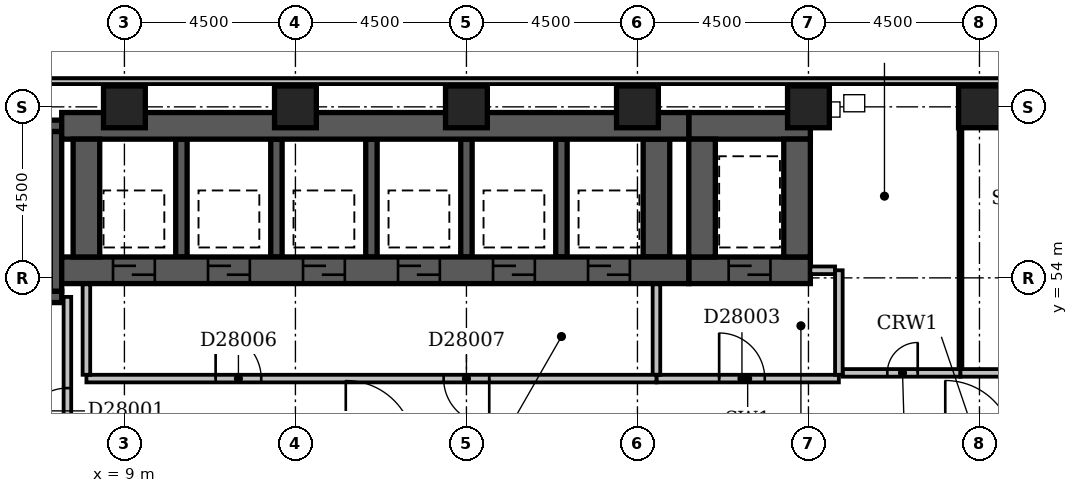
"""IFC4 building model, lengths in metres.
Left out: names, types, materials, properties, quantities, classifications, styles, units other than length and angle.
Written with IfcOpenShell. Run it as: python <this file> out.ifc"""

import sys

from ifc_helpers import new_model, si_unit, direction, frame, frame_2d, origin, origin_2d, place, context, subcontext, project, spatial, rectangle, extrude, element, fill, save


model = new_model("IFC4")
c1 = context("Model", 3, precision=1e-05, world=origin(), true_north=direction((0.0, 1.0)))
c2 = subcontext(c1, "Body", "Model", "MODEL_VIEW")
j1 = project(units=[si_unit("LENGTHUNIT", "METRE"), si_unit("PLANEANGLEUNIT", "RADIAN")], contexts=[c1])
p1 = place(None, origin())
s1 = spatial("IfcSite", under=j1, at=p1, CompositionType="ELEMENT")
p2 = place(p1, origin())
s2 = spatial("IfcBuilding", under=s1, at=p2, CompositionType="ELEMENT")
p3 = place(p2, frame((0.0, 0.0, 113.6)))
s3 = spatial("IfcBuildingStorey", under=s2, at=p3, CompositionType="ELEMENT", Elevation=113.6)
p4 = place(p3, frame((0.35, 53.5, -0.5), z_axis=(0.0, 0.0, 1.0), x_axis=(1.0, 0.0, 0.0)))
e1 = element("IfcWall", 1, at=p4, inside=s3, PredefinedType="SHEAR", context=c2, shape_type="SweptSolid", body=[
    extrude(rectangle(XDim=7.0, YDim=0.3, at=frame_2d((3.5, 0.0))), origin(), (0.0, 0.0, 1.0), 6.2),
])
p5 = place(p4, frame((5.58, 0.0, 0.5)))
e2 = element("IfcOpeningElement", 2, at=p5, cuts=e1, PredefinedType="OPENING", context=c2, shape_type="SweptSolid", body=[
    extrude(rectangle(XDim=1.1, YDim=2.1, at=frame_2d((0.55, 1.05))), frame((0.0, 0.162, 0.0), z_axis=(0.0, -1.0, 0.0), x_axis=(1.0, 0.0, 0.0)), (0.0, 0.0, 1.0), 0.324),
])
p6 = place(p3, frame((0.35, 58.0, -0.5), z_axis=(0.0, 0.0, 1.0), x_axis=(1.0, 0.0, 0.0)))
e3 = element("IfcWall", 3, at=p6, inside=s3, PredefinedType="SHEAR", context=c2, shape_type="SweptSolid", body=[
    extrude(rectangle(XDim=7.0, YDim=0.3, at=frame_2d((3.5, 0.0))), origin(), (0.0, 0.0, 1.0), 6.2),
])
p7 = place(p3, frame((7.2, 53.65, -0.5), z_axis=(0.0, 0.0, 1.0), x_axis=(0.0, 1.0, 0.0)))
e4 = element("IfcWall", 4, at=p7, inside=s3, PredefinedType="SHEAR", context=c2, shape_type="SweptSolid", body=[
    extrude(rectangle(XDim=4.2, YDim=0.3, at=frame_2d((2.1, 0.0))), origin(), (0.0, 0.0, 1.0), 6.2),
])
p8 = place(p3, frame((7.35, 54.2, -0.5), z_axis=(0.0, 0.0, 1.0), x_axis=(1.0, 0.0, 0.0)))
e5 = element("IfcWall", 5, at=p8, inside=s3, PredefinedType="SHEAR", context=c2, shape_type="SweptSolid", body=[
    extrude(rectangle(XDim=16.5, YDim=0.7, at=frame_2d((8.25, 0.0))), origin(), (0.0, 0.0, 1.0), 6.2),
])
p9 = place(p8, frame((1.35, 0.0, 0.5)))
e6 = element("IfcOpeningElement", 6, at=p9, cuts=e5, PredefinedType="OPENING", context=c2, shape_type="SweptSolid", body=[
    extrude(rectangle(XDim=1.1, YDim=2.1, at=frame_2d((0.55, 1.05))), frame((0.0, 0.362, 0.0), z_axis=(0.0, -1.0, 0.0), x_axis=(1.0, 0.0, 0.0)), (0.0, 0.0, 1.0), 0.724),
])
p10 = place(p8, frame((3.85, 0.0, 0.5)))
e7 = element("IfcOpeningElement", 7, at=p10, cuts=e5, PredefinedType="OPENING", context=c2, shape_type="SweptSolid", body=[
    extrude(rectangle(XDim=1.1, YDim=2.1, at=frame_2d((0.55, 1.05))), frame((0.0, 0.362, 0.0), z_axis=(0.0, -1.0, 0.0), x_axis=(1.0, 0.0, 0.0)), (0.0, 0.0, 1.0), 0.724),
])
p11 = place(p8, frame((6.35, 0.0, 0.5)))
e8 = element("IfcOpeningElement", 8, at=p11, cuts=e5, PredefinedType="OPENING", context=c2, shape_type="SweptSolid", body=[
    extrude(rectangle(XDim=1.1, YDim=2.1, at=frame_2d((0.55, 1.05))), frame((0.0, 0.362, 0.0), z_axis=(0.0, -1.0, 0.0), x_axis=(1.0, 0.0, 0.0)), (0.0, 0.0, 1.0), 0.724),
])
p12 = place(p8, frame((8.85, 0.0, 0.5)))
e9 = element("IfcOpeningElement", 9, at=p12, cuts=e5, PredefinedType="OPENING", context=c2, shape_type="SweptSolid", body=[
    extrude(rectangle(XDim=1.1, YDim=2.1, at=frame_2d((0.55, 1.05))), frame((0.0, 0.362, 0.0), z_axis=(0.0, -1.0, 0.0), x_axis=(1.0, 0.0, 0.0)), (0.0, 0.0, 1.0), 0.724),
])
p13 = place(p8, frame((11.35, 0.0, 0.5)))
e10 = element("IfcOpeningElement", 10, at=p13, cuts=e5, PredefinedType="OPENING", context=c2, shape_type="SweptSolid", body=[
    extrude(rectangle(XDim=1.1, YDim=2.1, at=frame_2d((0.55, 1.05))), frame((0.0, 0.362, 0.0), z_axis=(0.0, -1.0, 0.0), x_axis=(1.0, 0.0, 0.0)), (0.0, 0.0, 1.0), 0.724),
])
p14 = place(p8, frame((13.85, 0.0, 0.5)))
e11 = element("IfcOpeningElement", 11, at=p14, cuts=e5, PredefinedType="OPENING", context=c2, shape_type="SweptSolid", body=[
    extrude(rectangle(XDim=1.1, YDim=2.1, at=frame_2d((0.55, 1.05))), frame((0.0, 0.362, 0.0), z_axis=(0.0, -1.0, 0.0), x_axis=(1.0, 0.0, 0.0)), (0.0, 0.0, 1.0), 0.724),
])
p15 = place(p3, frame((7.35, 58.0, -0.5), z_axis=(0.0, 0.0, 1.0), x_axis=(1.0, 0.0, 0.0)))
e12 = element("IfcWall", 12, at=p15, inside=s3, PredefinedType="SHEAR", context=c2, shape_type="SweptSolid", body=[
    extrude(rectangle(XDim=16.5, YDim=0.7, at=frame_2d((8.25, 0.0))), origin(), (0.0, 0.0, 1.0), 6.2),
])
p16 = place(p3, frame((8.0, 54.55, -0.5), z_axis=(0.0, 0.0, 1.0), x_axis=(0.0, 1.0, 0.0)))
e13 = element("IfcWall", 13, at=p16, inside=s3, PredefinedType="SHEAR", context=c2, shape_type="SweptSolid", body=[
    extrude(rectangle(XDim=3.1, YDim=0.7, at=frame_2d((1.55, 0.0))), origin(), (0.0, 0.0, 1.0), 6.2),
])
for number, where, z_axis, x_axis in (
    (14, (10.5, 54.55, -0.5), (0.0, 0.0, 1.0), (0.0, 1.0, 0.0)),
    (15, (13.0, 54.55, -0.5), (0.0, 0.0, 1.0), (0.0, 1.0, 0.0)),
    (16, (15.5, 54.55, -0.5), (0.0, 0.0, 1.0), (0.0, 1.0, 0.0)),
    (17, (18.0, 54.55, -0.5), (0.0, 0.0, 1.0), (0.0, 1.0, 0.0)),
    (18, (20.5, 54.55, -0.5), (0.0, 0.0, 1.0), (0.0, 1.0, 0.0)),
):
    element("IfcWall", number, at=place(p3, frame(where, z_axis=z_axis, x_axis=x_axis)), inside=s3, PredefinedType="SHEAR", context=c2, shape_type="SweptSolid", body=[
        extrude(rectangle(XDim=3.1, YDim=0.3, at=frame_2d((1.55, 0.0))), origin(), (0.0, 0.0, 1.0), 6.2),
    ])
p17 = place(p3, frame((23.0, 54.55, -0.5), z_axis=(0.0, 0.0, 1.0), x_axis=(0.0, 1.0, 0.0)))
e19 = element("IfcWall", 19, at=p17, inside=s3, PredefinedType="SHEAR", context=c2, shape_type="SweptSolid", body=[
    extrude(rectangle(XDim=3.1, YDim=0.7, at=frame_2d((1.55, 0.0))), origin(), (0.0, 0.0, 1.0), 6.2),
])
p18 = place(p3, frame((23.85, 54.2, -0.5), z_axis=(0.0, 0.0, 1.0), x_axis=(1.0, 0.0, 0.0)))
e20 = element("IfcWall", 20, at=p18, inside=s3, PredefinedType="SHEAR", context=c2, shape_type="SweptSolid", body=[
    extrude(rectangle(XDim=3.2, YDim=0.7, at=frame_2d((1.6, 0.0))), origin(), (0.0, 0.0, 1.0), 6.2),
])
p19 = place(p18, frame((1.05, 0.0, 0.5)))
e21 = element("IfcOpeningElement", 21, at=p19, cuts=e20, PredefinedType="OPENING", context=c2, shape_type="SweptSolid", body=[
    extrude(rectangle(XDim=1.1, YDim=2.1, at=frame_2d((0.55, 1.05))), frame((0.0, 0.362, 0.0), z_axis=(0.0, -1.0, 0.0), x_axis=(1.0, 0.0, 0.0)), (0.0, 0.0, 1.0), 0.724),
])
p20 = place(p3, frame((23.85, 58.0, -0.5), z_axis=(0.0, 0.0, 1.0), x_axis=(1.0, 0.0, 0.0)))
e22 = element("IfcWall", 22, at=p20, inside=s3, PredefinedType="SHEAR", context=c2, shape_type="SweptSolid", body=[
    extrude(rectangle(XDim=3.2, YDim=0.7, at=frame_2d((1.6, 0.0))), origin(), (0.0, 0.0, 1.0), 6.2),
])
for number, where, z_axis, x_axis in (
    (23, (24.2, 54.55, -0.5), (0.0, 0.0, 1.0), (0.0, 1.0, 0.0)),
    (24, (26.7, 54.55, -0.5), (0.0, 0.0, 1.0), (0.0, 1.0, 0.0)),
):
    element("IfcWall", number, at=place(p3, frame(where, z_axis=z_axis, x_axis=x_axis)), inside=s3, PredefinedType="SHEAR", context=c2, shape_type="SweptSolid", body=[
        extrude(rectangle(XDim=3.1, YDim=0.7, at=frame_2d((1.55, 0.0))), origin(), (0.0, 0.0, 1.0), 6.2),
    ])
for number, where, z_axis, x_axis in (
    (25, (9.0, 58.5, -0.5), (0.0, 0.0, 1.0), (1.0, 0.0, 0.0)),
    (26, (13.5, 58.5, -0.5), (0.0, 0.0, 1.0), (1.0, 0.0, 0.0)),
    (27, (18.0, 58.5, -0.5), (0.0, 0.0, 1.0), (1.0, 0.0, 0.0)),
    (28, (22.5, 58.5, -0.5), (0.0, 0.0, 1.0), (1.0, 0.0, 0.0)),
    (29, (27.0, 58.5, -0.5), (0.0, 0.0, 1.0), (1.0, 0.0, 0.0)),
    (30, (31.5, 58.5, -0.5), (0.0, 0.0, 1.0), (1.0, 0.0, 0.0)),
):
    element("IfcColumn", number, at=place(p3, frame(where, z_axis=z_axis, x_axis=x_axis)), inside=s3, PredefinedType="COLUMN", context=c2, shape_type="SweptSolid", body=[
        extrude(rectangle(XDim=1.1, YDim=1.1, at=origin_2d()), origin(), (0.0, 0.0, 1.0), 6.2),
    ])
p21 = place(p3, frame((68.1, 59.175, 0.0), z_axis=(0.0, 0.0, 1.0), x_axis=(-1.0, 0.0, 0.0)))
e31 = element("IfcWall", 31, at=p21, inside=s3, PredefinedType="STANDARD", context=c2, shape_type="SweptSolid", body=[
    extrude(rectangle(XDim=68.85, YDim=0.15, at=frame_2d((34.425, 0.0))), origin(), (0.0, 0.0, 1.0), 1.1),
])
p22 = place(p3, frame((68.1, 59.175, 1.1), z_axis=(0.0, 0.0, 1.0), x_axis=(-1.0, 0.0, 0.0)))
e32 = element("IfcWall", 32, at=p22, inside=s3, PredefinedType="STANDARD", context=c2, shape_type="SweptSolid", body=[
    extrude(rectangle(XDim=68.85, YDim=0.15, at=frame_2d((34.425, 0.0))), origin(), (0.0, 0.0, 1.0), 4.0),
])
p23 = place(p3, frame((8.0, 51.35, 0.0), z_axis=(0.0, 0.0, 1.0), x_axis=(1.0, 0.0, 0.0)))
e33 = element("IfcWall", 33, at=p23, inside=s3, PredefinedType="PARTITIONING", context=c2, shape_type="SweptSolid", body=[
    extrude(rectangle(XDim=15.0, YDim=0.2, at=frame_2d((7.5, 0.0))), origin(), (0.0, 0.0, 1.0), 5.7),
])
p24 = place(p23, frame((3.4, 0.0, 0.0)))
e34 = element("IfcOpeningElement", 34, at=p24, cuts=e33, PredefinedType="OPENING", context=c2, shape_type="SweptSolid", body=[
    extrude(rectangle(XDim=1.2, YDim=2.1, at=frame_2d((0.6, 1.05))), frame((0.0, 0.112, 0.0), z_axis=(0.0, -1.0, 0.0), x_axis=(1.0, 0.0, 0.0)), (0.0, 0.0, 1.0), 0.224),
])
p25 = place(p23, frame((9.4, 0.0, 0.0)))
e35 = element("IfcOpeningElement", 35, at=p25, cuts=e33, PredefinedType="OPENING", context=c2, shape_type="SweptSolid", body=[
    extrude(rectangle(XDim=1.2, YDim=2.1, at=frame_2d((0.6, 1.05))), frame((0.0, 0.112, 0.0), z_axis=(0.0, -1.0, 0.0), x_axis=(1.0, 0.0, 0.0)), (0.0, 0.0, 1.0), 0.224),
])
for number, where, z_axis, x_axis in (
    (36, (23.0, 51.45, 0.0), (0.0, 0.0, 1.0), (0.0, 1.0, 0.0)),
    (37, (8.0, 51.45, 0.0), (0.0, 0.0, 1.0), (0.0, 1.0, 0.0)),
):
    element("IfcWall", number, at=place(p3, frame(where, z_axis=z_axis, x_axis=x_axis)), inside=s3, PredefinedType="PARTITIONING", context=c2, shape_type="SweptSolid", body=[
        extrude(rectangle(XDim=2.38, YDim=0.2, at=frame_2d((1.19, 0.0))), origin(), (0.0, 0.0, 1.0), 5.7),
    ])
p26 = place(p3, frame((23.0, 51.35, 0.0), z_axis=(0.0, 0.0, 1.0), x_axis=(1.0, 0.0, 0.0)))
e38 = element("IfcWall", 38, at=p26, inside=s3, PredefinedType="PARTITIONING", context=c2, shape_type="SweptSolid", body=[
    extrude(rectangle(XDim=4.8, YDim=0.2, at=frame_2d((2.4, 0.0))), origin(), (0.0, 0.0, 1.0), 5.7),
])
p27 = place(p26, frame((1.65, 0.0, 0.0)))
e39 = element("IfcOpeningElement", 39, at=p27, cuts=e38, PredefinedType="OPENING", context=c2, shape_type="SweptSolid", body=[
    extrude(rectangle(XDim=1.2, YDim=2.1, at=frame_2d((0.6, 1.05))), frame((0.0, 0.112, 0.0), z_axis=(0.0, -1.0, 0.0), x_axis=(1.0, 0.0, 0.0)), (0.0, 0.0, 1.0), 0.224),
])
p28 = place(p3, frame((27.8, 51.45, 0.0), z_axis=(0.0, 0.0, 1.0), x_axis=(0.0, 1.0, 0.0)))
e40 = element("IfcWall", 40, at=p28, inside=s3, PredefinedType="PARTITIONING", context=c2, shape_type="SweptSolid", body=[
    extrude(rectangle(XDim=2.75, YDim=0.2, at=frame_2d((1.375, 0.0))), origin(), (0.0, 0.0, 1.0), 5.7),
])
p29 = place(p3, frame((27.05, 54.2, 0.0), z_axis=(0.0, 0.0, 1.0), x_axis=(1.0, 0.0, 0.0)))
e41 = element("IfcWall", 41, at=p29, inside=s3, PredefinedType="PARTITIONING", context=c2, shape_type="SweptSolid", body=[
    extrude(rectangle(XDim=0.65, YDim=0.2, at=frame_2d((0.325, 0.0))), origin(), (0.0, 0.0, 1.0), 5.7),
])
p30 = place(p3, frame((7.5, 49.6, 0.0), z_axis=(0.0, 0.0, 1.0), x_axis=(0.0, 1.0, 0.0)))
e42 = element("IfcWall", 42, at=p30, inside=s3, PredefinedType="PARTITIONING", context=c2, shape_type="SweptSolid", body=[
    extrude(rectangle(XDim=3.9, YDim=0.2, at=frame_2d((1.95, 0.0))), origin(), (0.0, 0.0, 1.0), 5.7),
])
p31 = place(p30, frame((0.3, 0.0, 0.0)))
e43 = element("IfcOpeningElement", 43, at=p31, cuts=e42, PredefinedType="OPENING", context=c2, shape_type="SweptSolid", body=[
    extrude(rectangle(XDim=1.2, YDim=2.1, at=frame_2d((0.6, 1.05))), frame((0.0, 0.112, 0.0), z_axis=(0.0, -1.0, 0.0), x_axis=(1.0, 0.0, 0.0)), (0.0, 0.0, 1.0), 0.224),
])
p32 = place(p3, frame((31.0, 51.5, 0.0), z_axis=(0.0, 0.0, 1.0), x_axis=(-1.0, 0.0, 0.0)))
e44 = element("IfcWall", 44, at=p32, inside=s3, PredefinedType="PARTITIONING", context=c2, shape_type="SweptSolid", body=[
    extrude(rectangle(XDim=3.1, YDim=0.2, at=frame_2d((1.55, 0.0))), origin(), (0.0, 0.0, 1.0), 5.7),
])
p33 = place(p32, frame((1.125, 0.0, 0.0)))
e45 = element("IfcOpeningElement", 45, at=p33, cuts=e44, PredefinedType="OPENING", context=c2, shape_type="SweptSolid", body=[
    extrude(rectangle(XDim=0.8, YDim=2.1, at=frame_2d((0.4, 1.05))), frame((0.0, 0.112, 0.0), z_axis=(0.0, -1.0, 0.0), x_axis=(1.0, 0.0, 0.0)), (0.0, 0.0, 1.0), 0.224),
])
p34 = place(p3, frame((37.2, 51.5, 0.0), z_axis=(0.0, 0.0, 1.0), x_axis=(-1.0, 0.0, 0.0)))
e46 = element("IfcWall", 46, at=p34, inside=s3, PredefinedType="PARTITIONING", context=c2, shape_type="SweptSolid", body=[
    extrude(rectangle(XDim=6.2, YDim=0.2, at=frame_2d((3.1, 0.0))), origin(), (0.0, 0.0, 1.0), 5.7),
])
p35 = place(p34, frame((2.675, 0.0, 0.0)))
e47 = element("IfcOpeningElement", 47, at=p35, cuts=e46, PredefinedType="OPENING", context=c2, shape_type="SweptSolid", body=[
    extrude(rectangle(XDim=0.9, YDim=2.1, at=frame_2d((0.45, 1.05))), frame((0.0, 0.112, 0.0), z_axis=(0.0, -1.0, 0.0), x_axis=(1.0, 0.0, 0.0)), (0.0, 0.0, 1.0), 0.224),
])
p36 = place(p3, frame((31.0, 58.5, 0.0), z_axis=(0.0, 0.0, 1.0), x_axis=(0.0, -1.0, 0.0)))
e48 = element("IfcWall", 48, at=p36, inside=s3, PredefinedType="PARTITIONING", context=c2, shape_type="SweptSolid", body=[
    extrude(rectangle(XDim=6.9, YDim=0.1, at=frame_2d((3.45, 0.0))), origin(), (0.0, 0.0, 1.0), 5.7),
])
p37 = place(p31, origin())
e49 = element("IfcDoor", 49, at=p37, inside=s3, OperationType="SINGLE_SWING_LEFT", PredefinedType="DOOR", context=c2, shape_type="SweptSolid", body=[
    extrude(rectangle(XDim=1.2, YDim=2.1, at=frame_2d((0.6, 1.05))), frame((0.0, 0.025, 0.0), z_axis=(0.0, -1.0, 0.0), x_axis=(1.0, 0.0, 0.0)), (0.0, 0.0, 1.0), 0.05),
])
fill(e43, e49)
p38 = place(p27, origin())
e50 = element("IfcDoor", 50, at=p38, inside=s3, OperationType="SINGLE_SWING_LEFT", PredefinedType="DOOR", context=c2, shape_type="SweptSolid", body=[
    extrude(rectangle(XDim=1.2, YDim=2.1, at=frame_2d((0.6, 1.05))), frame((0.0, 0.025, 0.0), z_axis=(0.0, -1.0, 0.0), x_axis=(1.0, 0.0, 0.0)), (0.0, 0.0, 1.0), 0.05),
])
fill(e39, e50)
p39 = place(p19, origin())
e51 = element("IfcDoor", 51, at=p39, inside=s3, OperationType="SLIDING_TO_LEFT", PredefinedType="DOOR", context=c2, shape_type="SweptSolid", body=[
    extrude(rectangle(XDim=1.1, YDim=2.1, at=frame_2d((0.55, 1.05))), frame((0.0, 0.025, 0.0), z_axis=(0.0, -1.0, 0.0), x_axis=(1.0, 0.0, 0.0)), (0.0, 0.0, 1.0), 0.05),
])
fill(e21, e51)
p40 = place(p9, origin())
e52 = element("IfcDoor", 52, at=p40, inside=s3, OperationType="SLIDING_TO_LEFT", PredefinedType="DOOR", context=c2, shape_type="SweptSolid", body=[
    extrude(rectangle(XDim=1.1, YDim=2.1, at=frame_2d((0.55, 1.05))), frame((0.0, 0.025, 0.0), z_axis=(0.0, -1.0, 0.0), x_axis=(1.0, 0.0, 0.0)), (0.0, 0.0, 1.0), 0.05),
])
fill(e6, e52)
p41 = place(p10, origin())
e53 = element("IfcDoor", 53, at=p41, inside=s3, OperationType="SLIDING_TO_LEFT", PredefinedType="DOOR", context=c2, shape_type="SweptSolid", body=[
    extrude(rectangle(XDim=1.1, YDim=2.1, at=frame_2d((0.55, 1.05))), frame((0.0, 0.025, 0.0), z_axis=(0.0, -1.0, 0.0), x_axis=(1.0, 0.0, 0.0)), (0.0, 0.0, 1.0), 0.05),
])
fill(e7, e53)
p42 = place(p11, origin())
e54 = element("IfcDoor", 54, at=p42, inside=s3, OperationType="SLIDING_TO_LEFT", PredefinedType="DOOR", context=c2, shape_type="SweptSolid", body=[
    extrude(rectangle(XDim=1.1, YDim=2.1, at=frame_2d((0.55, 1.05))), frame((0.0, 0.025, 0.0), z_axis=(0.0, -1.0, 0.0), x_axis=(1.0, 0.0, 0.0)), (0.0, 0.0, 1.0), 0.05),
])
fill(e8, e54)
p43 = place(p12, origin())
e55 = element("IfcDoor", 55, at=p43, inside=s3, OperationType="SLIDING_TO_LEFT", PredefinedType="DOOR", context=c2, shape_type="SweptSolid", body=[
    extrude(rectangle(XDim=1.1, YDim=2.1, at=frame_2d((0.55, 1.05))), frame((0.0, 0.025, 0.0), z_axis=(0.0, -1.0, 0.0), x_axis=(1.0, 0.0, 0.0)), (0.0, 0.0, 1.0), 0.05),
])
fill(e9, e55)
p44 = place(p13, origin())
e56 = element("IfcDoor", 56, at=p44, inside=s3, OperationType="SLIDING_TO_LEFT", PredefinedType="DOOR", context=c2, shape_type="SweptSolid", body=[
    extrude(rectangle(XDim=1.1, YDim=2.1, at=frame_2d((0.55, 1.05))), frame((0.0, 0.025, 0.0), z_axis=(0.0, -1.0, 0.0), x_axis=(1.0, 0.0, 0.0)), (0.0, 0.0, 1.0), 0.05),
])
fill(e10, e56)
p45 = place(p14, origin())
e57 = element("IfcDoor", 57, at=p45, inside=s3, OperationType="SLIDING_TO_LEFT", PredefinedType="DOOR", context=c2, shape_type="SweptSolid", body=[
    extrude(rectangle(XDim=1.1, YDim=2.1, at=frame_2d((0.55, 1.05))), frame((0.0, 0.025, 0.0), z_axis=(0.0, -1.0, 0.0), x_axis=(1.0, 0.0, 0.0)), (0.0, 0.0, 1.0), 0.05),
])
fill(e11, e57)
p46 = place(p24, origin())
e58 = element("IfcDoor", 58, at=p46, inside=s3, OperationType="SINGLE_SWING_LEFT", PredefinedType="DOOR", context=c2, shape_type="SweptSolid", body=[
    extrude(rectangle(XDim=1.2, YDim=2.1, at=frame_2d((0.6, 1.05))), frame((0.0, 0.025, 0.0), z_axis=(0.0, -1.0, 0.0), x_axis=(1.0, 0.0, 0.0)), (0.0, 0.0, 1.0), 0.05),
])
fill(e34, e58)
p47 = place(p25, origin())
e59 = element("IfcDoor", 59, at=p47, inside=s3, OperationType="SINGLE_SWING_RIGHT", PredefinedType="DOOR", context=c2, shape_type="SweptSolid", body=[
    extrude(rectangle(XDim=1.2, YDim=2.1, at=frame_2d((0.6, 1.05))), frame((0.0, 0.025, 0.0), z_axis=(0.0, -1.0, 0.0), x_axis=(1.0, 0.0, 0.0)), (0.0, 0.0, 1.0), 0.05),
])
fill(e35, e59)
p48 = place(p33, frame((0.8, 0.0, 0.0), z_axis=(0.0, 0.0, 1.0), x_axis=(-1.0, 0.0, 0.0)))
e60 = element("IfcDoor", 60, at=p48, inside=s3, OperationType="SINGLE_SWING_RIGHT", PredefinedType="DOOR", context=c2, shape_type="SweptSolid", body=[
    extrude(rectangle(XDim=0.8, YDim=2.1, at=frame_2d((0.4, 1.05))), frame((0.0, 0.025, 0.0), z_axis=(0.0, -1.0, 0.0), x_axis=(1.0, 0.0, 0.0)), (0.0, 0.0, 1.0), 0.05),
])
fill(e45, e60)
save(model, sys.argv[1])
